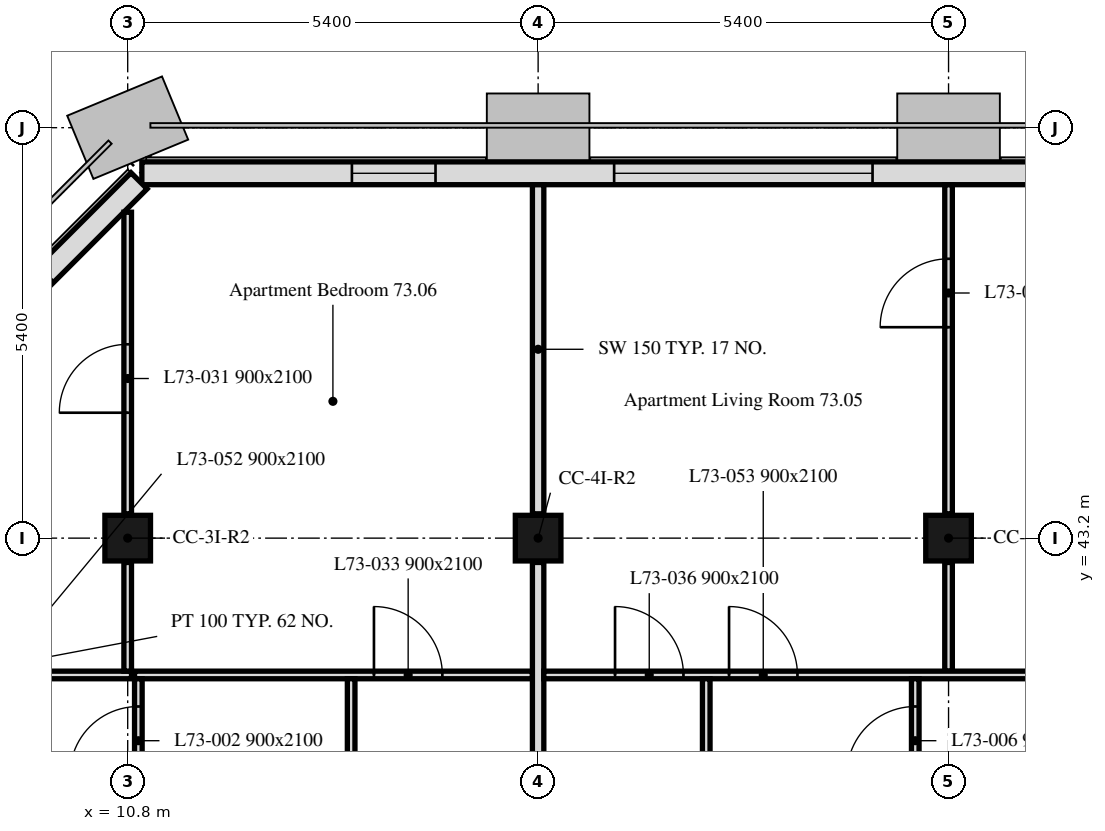
"""IFC4 building model, lengths in metres.
Left out: names, types, materials, properties, quantities, classifications, styles, units other than length and angle.
Written with IfcOpenShell. Run it as: python <this file> out.ifc"""

import sys

from ifc_helpers import new_model, si_unit, direction, frame, frame_2d, origin, origin_2d, place, context, subcontext, project, spatial, rectangle, extrude, element, fill, save


model = new_model("IFC4")
c1 = context("Model", 3, precision=1e-05, world=origin(), true_north=direction((0.0, 1.0)))
c2 = subcontext(c1, "Body", "Model", "MODEL_VIEW")
j1 = project(units=[si_unit("LENGTHUNIT", "METRE"), si_unit("PLANEANGLEUNIT", "RADIAN")], contexts=[c1])
p1 = place(None, origin())
s1 = spatial("IfcSite", under=j1, at=p1, CompositionType="ELEMENT")
p2 = place(p1, origin())
s2 = spatial("IfcBuilding", under=s1, at=p2, CompositionType="ELEMENT")
p3 = place(p2, frame((0.0, 0.0, 295.0)))
s3 = spatial("IfcBuildingStorey", under=s2, at=p3, CompositionType="ELEMENT", Elevation=295.0)
for number, where, z_axis, x_axis in (
    (1, (10.8, 43.2, 0.0), (0.0, 0.0, 1.0), (1.0, 0.0, 0.0)),
    (2, (16.2, 43.2, 0.0), (0.0, 0.0, 1.0), (1.0, 0.0, 0.0)),
    (3, (21.6, 43.2, 0.0), (0.0, 0.0, 1.0), (1.0, 0.0, 0.0)),
):
    element("IfcColumn", number, at=place(p3, frame(where, z_axis=z_axis, x_axis=x_axis)), inside=s3, PredefinedType="COLUMN", context=c2, shape_type="SweptSolid", body=[
        extrude(rectangle(XDim=0.6, YDim=0.6, at=origin_2d()), origin(), (0.0, 0.0, 1.0), 3.0),
    ])
p4 = place(p3, frame((43.014, 48.0, 0.0), z_axis=(0.0, 0.0, 1.0), x_axis=(-1.0, 0.0, 0.0)))
e4 = element("IfcWall", 4, at=p4, inside=s3, PredefinedType="SOLIDWALL", context=c2, shape_type="SweptSolid", body=[
    extrude(rectangle(XDim=32.027, YDim=0.3, at=frame_2d((16.014, 0.0))), origin(), (0.0, 0.0, 1.0), 3.0),
])
p5 = place(p4, frame((0.814, 0.0, 0.9)))
e5 = element("IfcOpeningElement", 5, at=p5, cuts=e4, PredefinedType="OPENING", context=c2, shape_type="SweptSolid", body=[
    extrude(rectangle(XDim=3.4, YDim=1.7, at=frame_2d((1.7, 0.85))), frame((0.0, 0.16, 0.0), z_axis=(0.0, -1.0, 0.0), x_axis=(1.0, 0.0, 0.0)), (0.0, 0.0, 1.0), 0.32),
])
p6 = place(p4, frame((6.564, 0.0, 0.9)))
e6 = element("IfcOpeningElement", 6, at=p6, cuts=e4, PredefinedType="OPENING", context=c2, shape_type="SweptSolid", body=[
    extrude(rectangle(XDim=1.1, YDim=1.7, at=frame_2d((0.55, 0.85))), frame((0.0, 0.16, 0.0), z_axis=(0.0, -1.0, 0.0), x_axis=(1.0, 0.0, 0.0)), (0.0, 0.0, 1.0), 0.32),
])
p7 = place(p4, frame((11.614, 0.0, 0.9)))
e7 = element("IfcOpeningElement", 7, at=p7, cuts=e4, PredefinedType="OPENING", context=c2, shape_type="SweptSolid", body=[
    extrude(rectangle(XDim=3.4, YDim=1.7, at=frame_2d((1.7, 0.85))), frame((0.0, 0.16, 0.0), z_axis=(0.0, -1.0, 0.0), x_axis=(1.0, 0.0, 0.0)), (0.0, 0.0, 1.0), 0.32),
])
p8 = place(p4, frame((17.364, 0.0, 0.9)))
e8 = element("IfcOpeningElement", 8, at=p8, cuts=e4, PredefinedType="OPENING", context=c2, shape_type="SweptSolid", body=[
    extrude(rectangle(XDim=1.1, YDim=1.7, at=frame_2d((0.55, 0.85))), frame((0.0, 0.16, 0.0), z_axis=(0.0, -1.0, 0.0), x_axis=(1.0, 0.0, 0.0)), (0.0, 0.0, 1.0), 0.32),
])
p9 = place(p4, frame((22.414, 0.0, 0.9)))
e9 = element("IfcOpeningElement", 9, at=p9, cuts=e4, PredefinedType="OPENING", context=c2, shape_type="SweptSolid", body=[
    extrude(rectangle(XDim=3.4, YDim=1.7, at=frame_2d((1.7, 0.85))), frame((0.0, 0.16, 0.0), z_axis=(0.0, -1.0, 0.0), x_axis=(1.0, 0.0, 0.0)), (0.0, 0.0, 1.0), 0.32),
])
p10 = place(p4, frame((28.164, 0.0, 0.9)))
e10 = element("IfcOpeningElement", 10, at=p10, cuts=e4, PredefinedType="OPENING", context=c2, shape_type="SweptSolid", body=[
    extrude(rectangle(XDim=1.1, YDim=1.7, at=frame_2d((0.55, 0.85))), frame((0.0, 0.16, 0.0), z_axis=(0.0, -1.0, 0.0), x_axis=(1.0, 0.0, 0.0)), (0.0, 0.0, 1.0), 0.32),
])
p11 = place(p3, frame((10.949, 47.901, 0.0), z_axis=(0.0, 0.0, 1.0), x_axis=(-0.707106781187, -0.707106781187, 0.0)))
e11 = element("IfcWall", 11, at=p11, inside=s3, PredefinedType="SOLIDWALL", context=c2, shape_type="SweptSolid", body=[
    extrude(rectangle(XDim=6.86, YDim=0.3, at=frame_2d((3.43, 0.0))), origin(), (0.0, 0.0, 1.0), 3.0),
])
p12 = place(p11, frame((1.73, 0.0, 0.9)))
e12 = element("IfcOpeningElement", 12, at=p12, cuts=e11, PredefinedType="OPENING", context=c2, shape_type="SweptSolid", body=[
    extrude(rectangle(XDim=3.4, YDim=1.7, at=frame_2d((1.7, 0.85))), frame((0.0, 0.16, 0.0), z_axis=(0.0, -1.0, 0.0), x_axis=(1.0, 0.0, 0.0)), (0.0, 0.0, 1.0), 0.32),
])
p13 = place(p3, frame((6.151, 41.4, 0.0), z_axis=(0.0, 0.0, 1.0), x_axis=(1.0, 0.0, 0.0)))
e13 = element("IfcWall", 13, at=p13, inside=s3, PredefinedType="PARTITIONING", context=c2, shape_type="SweptSolid", body=[
    extrude(rectangle(XDim=4.699, YDim=0.1, at=frame_2d((2.35, 0.0))), origin(), (0.0, 0.0, 1.0), 3.0),
])
p14 = place(p13, frame((1.079, 0.0, 0.0)))
e14 = element("IfcOpeningElement", 14, at=p14, cuts=e13, PredefinedType="OPENING", context=c2, shape_type="SweptSolid", body=[
    extrude(rectangle(XDim=0.9, YDim=2.1, at=frame_2d((0.45, 1.05))), frame((0.0, 0.05, 0.0), z_axis=(0.0, -1.0, 0.0), x_axis=(1.0, 0.0, 0.0)), (0.0, 0.0, 1.0), 0.1),
])
p15 = place(p13, frame((2.449, 0.0, 0.0)))
e15 = element("IfcOpeningElement", 15, at=p15, cuts=e13, PredefinedType="OPENING", context=c2, shape_type="SweptSolid", body=[
    extrude(rectangle(XDim=0.9, YDim=2.1, at=frame_2d((0.45, 1.05))), frame((0.0, 0.05, 0.0), z_axis=(0.0, -1.0, 0.0), x_axis=(1.0, 0.0, 0.0)), (0.0, 0.0, 1.0), 0.1),
])
p16 = place(p3, frame((10.8, 41.45, 0.0), z_axis=(0.0, 0.0, 1.0), x_axis=(0.0, 1.0, 0.0)))
e16 = element("IfcWall", 16, at=p16, inside=s3, PredefinedType="PARTITIONING", context=c2, shape_type="SweptSolid", body=[
    extrude(rectangle(XDim=1.43, YDim=0.1, at=frame_2d((0.715, 0.0))), origin(), (0.0, 0.0, 1.0), 3.0),
])
p17 = place(p3, frame((10.8, 43.52, 0.0), z_axis=(0.0, 0.0, 1.0), x_axis=(0.0, 1.0, 0.0)))
e17 = element("IfcWall", 17, at=p17, inside=s3, PredefinedType="PARTITIONING", context=c2, shape_type="SweptSolid", body=[
    extrude(rectangle(XDim=3.968, YDim=0.1, at=frame_2d((1.984, 0.0))), origin(), (0.0, 0.0, 1.0), 3.0),
])
p18 = place(p17, frame((1.33, 0.0, 0.0)))
e18 = element("IfcOpeningElement", 18, at=p18, cuts=e17, PredefinedType="OPENING", context=c2, shape_type="SweptSolid", body=[
    extrude(rectangle(XDim=0.9, YDim=2.1, at=frame_2d((0.45, 1.05))), frame((0.0, 0.05, 0.0), z_axis=(0.0, -1.0, 0.0), x_axis=(1.0, 0.0, 0.0)), (0.0, 0.0, 1.0), 0.1),
])
p19 = place(p3, frame((10.89, 41.4, 0.0), z_axis=(0.0, 0.0, 1.0), x_axis=(1.0, 0.0, 0.0)))
e19 = element("IfcWall", 19, at=p19, inside=s3, PredefinedType="PARTITIONING", context=c2, shape_type="SweptSolid", body=[
    extrude(rectangle(XDim=5.235, YDim=0.1, at=frame_2d((2.618, 0.0))), origin(), (0.0, 0.0, 1.0), 3.0),
])
p20 = place(p19, frame((3.15, 0.0, 0.0)))
e20 = element("IfcOpeningElement", 20, at=p20, cuts=e19, PredefinedType="OPENING", context=c2, shape_type="SweptSolid", body=[
    extrude(rectangle(XDim=0.9, YDim=2.1, at=frame_2d((0.45, 1.05))), frame((0.0, 0.05, 0.0), z_axis=(0.0, -1.0, 0.0), x_axis=(1.0, 0.0, 0.0)), (0.0, 0.0, 1.0), 0.1),
])
p21 = place(p3, frame((16.2, 43.52, 0.0), z_axis=(0.0, 0.0, 1.0), x_axis=(0.0, 1.0, 0.0)))
e21 = element("IfcWall", 21, at=p21, inside=s3, PredefinedType="PARTITIONING", context=c2, shape_type="SweptSolid", body=[
    extrude(rectangle(XDim=4.329, YDim=0.15, at=frame_2d((2.165, 0.0))), origin(), (0.0, 0.0, 1.0), 2.4),
])
p22 = place(p3, frame((10.94, 38.12, 0.0), z_axis=(0.0, 0.0, 1.0), x_axis=(0.0, 1.0, 0.0)))
e22 = element("IfcWall", 22, at=p22, inside=s3, PredefinedType="PARTITIONING", context=c2, shape_type="SweptSolid", body=[
    extrude(rectangle(XDim=3.23, YDim=0.1, at=frame_2d((1.615, 0.0))), origin(), (0.0, 0.0, 1.0), 3.0),
])
p23 = place(p22, frame((1.965, 0.0, 0.0)))
e23 = element("IfcOpeningElement", 23, at=p23, cuts=e22, PredefinedType="OPENING", context=c2, shape_type="SweptSolid", body=[
    extrude(rectangle(XDim=0.9, YDim=2.1, at=frame_2d((0.45, 1.05))), frame((0.0, 0.05, 0.0), z_axis=(0.0, -1.0, 0.0), x_axis=(1.0, 0.0, 0.0)), (0.0, 0.0, 1.0), 0.1),
])
p24 = place(p3, frame((13.74, 37.2, 0.0), z_axis=(0.0, 0.0, 1.0), x_axis=(0.0, 1.0, 0.0)))
e24 = element("IfcWall", 24, at=p24, inside=s3, PredefinedType="PARTITIONING", context=c2, shape_type="SweptSolid", body=[
    extrude(rectangle(XDim=4.15, YDim=0.1, at=frame_2d((2.075, 0.0))), origin(), (0.0, 0.0, 1.0), 3.0),
])
p25 = place(p3, frame((16.2, 38.12, 0.0), z_axis=(0.0, 0.0, 1.0), x_axis=(0.0, 1.0, 0.0)))
e25 = element("IfcWall", 25, at=p25, inside=s3, PredefinedType="PARTITIONING", context=c2, shape_type="SweptSolid", body=[
    extrude(rectangle(XDim=4.76, YDim=0.15, at=frame_2d((2.38, 0.0))), origin(), (0.0, 0.0, 1.0), 2.4),
])
p26 = place(p3, frame((21.6, 41.45, 0.0), z_axis=(0.0, 0.0, 1.0), x_axis=(0.0, 1.0, 0.0)))
e26 = element("IfcWall", 26, at=p26, inside=s3, PredefinedType="PARTITIONING", context=c2, shape_type="SweptSolid", body=[
    extrude(rectangle(XDim=1.43, YDim=0.1, at=frame_2d((0.715, 0.0))), origin(), (0.0, 0.0, 1.0), 2.4),
])
p27 = place(p3, frame((21.6, 43.52, 0.0), z_axis=(0.0, 0.0, 1.0), x_axis=(0.0, 1.0, 0.0)))
e27 = element("IfcWall", 27, at=p27, inside=s3, PredefinedType="PARTITIONING", context=c2, shape_type="SweptSolid", body=[
    extrude(rectangle(XDim=4.329, YDim=0.1, at=frame_2d((2.165, 0.0))), origin(), (0.0, 0.0, 1.0), 2.4),
])
p28 = place(p27, frame((2.455, 0.0, 0.0)))
e28 = element("IfcOpeningElement", 28, at=p28, cuts=e27, PredefinedType="OPENING", context=c2, shape_type="SweptSolid", body=[
    extrude(rectangle(XDim=0.9, YDim=2.1, at=frame_2d((0.45, 1.05))), frame((0.0, 0.05, 0.0), z_axis=(0.0, -1.0, 0.0), x_axis=(1.0, 0.0, 0.0)), (0.0, 0.0, 1.0), 0.1),
])
p29 = place(p3, frame((16.275, 41.4, 0.0), z_axis=(0.0, 0.0, 1.0), x_axis=(1.0, 0.0, 0.0)))
e29 = element("IfcWall", 29, at=p29, inside=s3, PredefinedType="PARTITIONING", context=c2, shape_type="SweptSolid", body=[
    extrude(rectangle(XDim=10.65, YDim=0.1, at=frame_2d((5.325, 0.0))), origin(), (0.0, 0.0, 1.0), 2.4),
])
p30 = place(p29, frame((0.937, 0.0, 0.0)))
e30 = element("IfcOpeningElement", 30, at=p30, cuts=e29, PredefinedType="OPENING", context=c2, shape_type="SweptSolid", body=[
    extrude(rectangle(XDim=0.9, YDim=2.1, at=frame_2d((0.45, 1.05))), frame((0.0, 0.05, 0.0), z_axis=(0.0, -1.0, 0.0), x_axis=(1.0, 0.0, 0.0)), (0.0, 0.0, 1.0), 0.1),
])
p31 = place(p29, frame((8.075, 0.0, 0.0)))
e31 = element("IfcOpeningElement", 31, at=p31, cuts=e29, PredefinedType="OPENING", context=c2, shape_type="SweptSolid", body=[
    extrude(rectangle(XDim=0.9, YDim=2.1, at=frame_2d((0.45, 1.05))), frame((0.0, 0.05, 0.0), z_axis=(0.0, -1.0, 0.0), x_axis=(1.0, 0.0, 0.0)), (0.0, 0.0, 1.0), 0.1),
])
p32 = place(p29, frame((2.437, 0.0, 0.0)))
e32 = element("IfcOpeningElement", 32, at=p32, cuts=e29, PredefinedType="OPENING", context=c2, shape_type="SweptSolid", body=[
    extrude(rectangle(XDim=0.9, YDim=2.1, at=frame_2d((0.45, 1.05))), frame((0.0, 0.05, 0.0), z_axis=(0.0, -1.0, 0.0), x_axis=(1.0, 0.0, 0.0)), (0.0, 0.0, 1.0), 0.1),
])
p33 = place(p3, frame((18.412, 34.725, 0.0), z_axis=(0.0, 0.0, 1.0), x_axis=(0.0, 1.0, 0.0)))
e33 = element("IfcWall", 33, at=p33, inside=s3, PredefinedType="PARTITIONING", context=c2, shape_type="SweptSolid", body=[
    extrude(rectangle(XDim=6.625, YDim=0.1, at=frame_2d((3.312, 0.0))), origin(), (0.0, 0.0, 1.0), 3.0),
])
p34 = place(p33, frame((0.558, 0.0, 0.0)))
e34 = element("IfcOpeningElement", 34, at=p34, cuts=e33, PredefinedType="OPENING", context=c2, shape_type="SweptSolid", body=[
    extrude(rectangle(XDim=0.9, YDim=2.1, at=frame_2d((0.45, 1.05))), frame((0.0, 0.05, 0.0), z_axis=(0.0, -1.0, 0.0), x_axis=(1.0, 0.0, 0.0)), (0.0, 0.0, 1.0), 0.1),
])
p35 = place(p33, frame((4.673, 0.0, 0.0)))
e35 = element("IfcOpeningElement", 35, at=p35, cuts=e33, PredefinedType="OPENING", context=c2, shape_type="SweptSolid", body=[
    extrude(rectangle(XDim=0.9, YDim=2.1, at=frame_2d((0.45, 1.05))), frame((0.0, 0.05, 0.0), z_axis=(0.0, -1.0, 0.0), x_axis=(1.0, 0.0, 0.0)), (0.0, 0.0, 1.0), 0.1),
])
p36 = place(p3, frame((21.162, 34.725, 0.0), z_axis=(0.0, 0.0, 1.0), x_axis=(0.0, 1.0, 0.0)))
e36 = element("IfcWall", 36, at=p36, inside=s3, PredefinedType="PARTITIONING", context=c2, shape_type="SweptSolid", body=[
    extrude(rectangle(XDim=6.625, YDim=0.1, at=frame_2d((3.312, 0.0))), origin(), (0.0, 0.0, 1.0), 3.0),
])
p37 = place(p36, frame((5.36, 0.0, 0.0)))
e37 = element("IfcOpeningElement", 37, at=p37, cuts=e36, PredefinedType="OPENING", context=c2, shape_type="SweptSolid", body=[
    extrude(rectangle(XDim=0.9, YDim=2.1, at=frame_2d((0.45, 1.05))), frame((0.0, 0.05, 0.0), z_axis=(0.0, -1.0, 0.0), x_axis=(1.0, 0.0, 0.0)), (0.0, 0.0, 1.0), 0.1),
])
p38 = place(p36, frame((0.25, 0.0, 0.0)))
e38 = element("IfcOpeningElement", 38, at=p38, cuts=e36, PredefinedType="OPENING", context=c2, shape_type="SweptSolid", body=[
    extrude(rectangle(XDim=0.9, YDim=2.1, at=frame_2d((0.45, 1.05))), frame((0.0, 0.05, 0.0), z_axis=(0.0, -1.0, 0.0), x_axis=(1.0, 0.0, 0.0)), (0.0, 0.0, 1.0), 0.1),
])
p39 = place(p9, origin())
e39 = element("IfcWindow", 39, at=p39, inside=s3, PartitioningType="SINGLE_PANEL", PredefinedType="WINDOW", context=c2, shape_type="SweptSolid", body=[
    extrude(rectangle(XDim=3.4, YDim=1.7, at=frame_2d((1.7, 0.85))), frame((0.0, 0.03, 0.0), z_axis=(0.0, -1.0, 0.0), x_axis=(1.0, 0.0, 0.0)), (0.0, 0.0, 1.0), 0.06),
])
fill(e9, e39)
p40 = place(p10, origin())
e40 = element("IfcWindow", 40, at=p40, inside=s3, PartitioningType="SINGLE_PANEL", PredefinedType="WINDOW", context=c2, shape_type="SweptSolid", body=[
    extrude(rectangle(XDim=1.1, YDim=1.7, at=frame_2d((0.55, 0.85))), frame((0.0, 0.03, 0.0), z_axis=(0.0, -1.0, 0.0), x_axis=(1.0, 0.0, 0.0)), (0.0, 0.0, 1.0), 0.06),
])
fill(e10, e40)
p41 = place(p23, origin())
e41 = element("IfcDoor", 41, at=p41, inside=s3, OperationType="SINGLE_SWING_RIGHT", PredefinedType="DOOR", context=c2, shape_type="SweptSolid", body=[
    extrude(rectangle(XDim=0.9, YDim=2.1, at=frame_2d((0.45, 1.05))), frame((0.0, 0.025, 0.0), z_axis=(0.0, -1.0, 0.0), x_axis=(1.0, 0.0, 0.0)), (0.0, 0.0, 1.0), 0.05),
])
fill(e23, e41)
p42 = place(p37, origin())
e42 = element("IfcDoor", 42, at=p42, inside=s3, OperationType="SINGLE_SWING_LEFT", PredefinedType="DOOR", context=c2, shape_type="SweptSolid", body=[
    extrude(rectangle(XDim=0.9, YDim=2.1, at=frame_2d((0.45, 1.05))), frame((0.0, 0.025, 0.0), z_axis=(0.0, -1.0, 0.0), x_axis=(1.0, 0.0, 0.0)), (0.0, 0.0, 1.0), 0.05),
])
fill(e37, e42)
p43 = place(p18, origin())
e43 = element("IfcDoor", 43, at=p43, inside=s3, OperationType="SINGLE_SWING_RIGHT", PredefinedType="DOOR", context=c2, shape_type="SweptSolid", body=[
    extrude(rectangle(XDim=0.9, YDim=2.1, at=frame_2d((0.45, 1.05))), frame((0.0, 0.025, 0.0), z_axis=(0.0, -1.0, 0.0), x_axis=(1.0, 0.0, 0.0)), (0.0, 0.0, 1.0), 0.05),
])
fill(e18, e43)
p44 = place(p20, origin())
e44 = element("IfcDoor", 44, at=p44, inside=s3, OperationType="SINGLE_SWING_LEFT", PredefinedType="DOOR", context=c2, shape_type="SweptSolid", body=[
    extrude(rectangle(XDim=0.9, YDim=2.1, at=frame_2d((0.45, 1.05))), frame((0.0, 0.025, 0.0), z_axis=(0.0, -1.0, 0.0), x_axis=(1.0, 0.0, 0.0)), (0.0, 0.0, 1.0), 0.05),
])
fill(e20, e44)
p45 = place(p28, origin())
e45 = element("IfcDoor", 45, at=p45, inside=s3, OperationType="SINGLE_SWING_RIGHT", PredefinedType="DOOR", context=c2, shape_type="SweptSolid", body=[
    extrude(rectangle(XDim=0.9, YDim=2.1, at=frame_2d((0.45, 1.05))), frame((0.0, 0.025, 0.0), z_axis=(0.0, -1.0, 0.0), x_axis=(1.0, 0.0, 0.0)), (0.0, 0.0, 1.0), 0.05),
])
fill(e28, e45)
p46 = place(p30, origin())
e46 = element("IfcDoor", 46, at=p46, inside=s3, OperationType="SINGLE_SWING_RIGHT", PredefinedType="DOOR", context=c2, shape_type="SweptSolid", body=[
    extrude(rectangle(XDim=0.9, YDim=2.1, at=frame_2d((0.45, 1.05))), frame((0.0, 0.025, 0.0), z_axis=(0.0, -1.0, 0.0), x_axis=(1.0, 0.0, 0.0)), (0.0, 0.0, 1.0), 0.05),
])
fill(e30, e46)
p47 = place(p32, origin())
e47 = element("IfcDoor", 47, at=p47, inside=s3, OperationType="SINGLE_SWING_LEFT", PredefinedType="DOOR", context=c2, shape_type="SweptSolid", body=[
    extrude(rectangle(XDim=0.9, YDim=2.1, at=frame_2d((0.45, 1.05))), frame((0.0, 0.025, 0.0), z_axis=(0.0, -1.0, 0.0), x_axis=(1.0, 0.0, 0.0)), (0.0, 0.0, 1.0), 0.05),
])
fill(e32, e47)
save(model, sys.argv[1])
